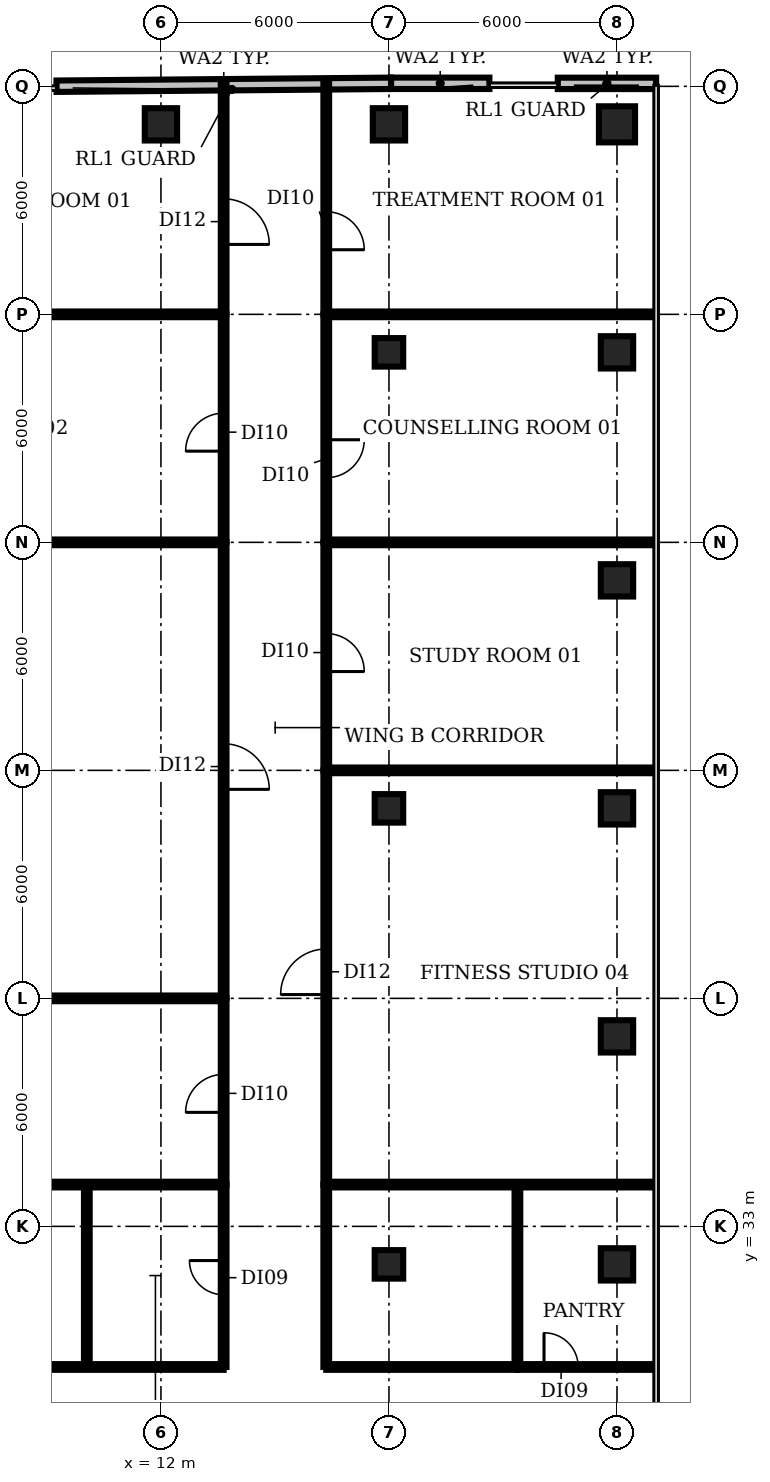
"""IFC4 building model, lengths in metres.
Left out: names, types, materials, properties, quantities, classifications, styles, units other than length and angle.
Written with IfcOpenShell. Run it as: python <this file> out.ifc"""

import sys

from ifc_helpers import new_model, si_unit, direction, frame, frame_2d, origin, origin_2d, place, context, subcontext, project, spatial, rectangle, circle, extrude, element, fill, save


model = new_model("IFC4")
c1 = context("Model", 3, precision=1e-05, world=origin(), true_north=direction((0.0, 1.0)))
c2 = subcontext(c1, "Body", "Model", "MODEL_VIEW")
j1 = project(units=[si_unit("LENGTHUNIT", "METRE"), si_unit("PLANEANGLEUNIT", "RADIAN")], contexts=[c1])
p1 = place(None, origin())
s1 = spatial("IfcSite", under=j1, at=p1, CompositionType="ELEMENT")
p2 = place(p1, origin())
s2 = spatial("IfcBuilding", under=s1, at=p2, CompositionType="ELEMENT")
p3 = place(p2, frame((0.0, 0.0, 171.8)))
s3 = spatial("IfcBuildingStorey", under=s2, at=p3, CompositionType="ELEMENT", Elevation=171.8)
p4 = place(p3, frame((12.0, 62.0, 0.0), z_axis=(0.0, 0.0, 1.0), x_axis=(1.0, 0.0, 0.0)))
e1 = element("IfcColumn", 1, at=p4, inside=s3, PredefinedType="COLUMN", context=c2, shape_type="SweptSolid", body=[
    extrude(rectangle(XDim=0.85, YDim=0.85, at=origin_2d()), origin(), (0.0, 0.0, 1.0), 3.85),
])
for number, where, z_axis, x_axis in (
    (2, (18.0, 32.0, 0.0), (0.0, 0.0, 1.0), (1.0, 0.0, 0.0)),
    (3, (18.0, 44.0, 0.0), (0.0, 0.0, 1.0), (1.0, 0.0, 0.0)),
    (4, (18.0, 56.0, 0.0), (0.0, 0.0, 1.0), (1.0, 0.0, 0.0)),
):
    element("IfcColumn", number, at=place(p3, frame(where, z_axis=z_axis, x_axis=x_axis)), inside=s3, PredefinedType="COLUMN", context=c2, shape_type="SweptSolid", body=[
        extrude(rectangle(XDim=0.75, YDim=0.75, at=origin_2d()), origin(), (0.0, 0.0, 1.0), 3.85),
    ])
for number, where, z_axis, x_axis in (
    (5, (18.0, 62.0, 0.0), (0.0, 0.0, 1.0), (1.0, 0.0, 0.0)),
    (6, (24.0, 32.0, 0.0), (0.0, 0.0, 1.0), (1.0, 0.0, 0.0)),
    (7, (24.0, 38.0, 0.0), (0.0, 0.0, 1.0), (1.0, 0.0, 0.0)),
    (8, (24.0, 44.0, 0.0), (0.0, 0.0, 1.0), (1.0, 0.0, 0.0)),
    (9, (24.0, 50.0, 0.0), (0.0, 0.0, 1.0), (1.0, 0.0, 0.0)),
    (10, (24.0, 56.0, 0.0), (0.0, 0.0, 1.0), (1.0, 0.0, 0.0)),
):
    element("IfcColumn", number, at=place(p3, frame(where, z_axis=z_axis, x_axis=x_axis)), inside=s3, PredefinedType="COLUMN", context=c2, shape_type="SweptSolid", body=[
        extrude(rectangle(XDim=0.85, YDim=0.85, at=origin_2d()), origin(), (0.0, 0.0, 1.0), 3.85),
    ])
p5 = place(p3, frame((24.0, 62.0, 0.0), z_axis=(0.0, 0.0, 1.0), x_axis=(1.0, 0.0, 0.0)))
e11 = element("IfcColumn", 11, at=p5, inside=s3, PredefinedType="COLUMN", context=c2, shape_type="SweptSolid", body=[
    extrude(circle(Radius=0.475, at=origin_2d()), origin(), (0.0, 0.0, 1.0), 3.85),
])
p6 = place(p3, frame((25.03, 63.078, 0.0), z_axis=(0.0, 0.0, 1.0), x_axis=(-1.0, 0.0, 0.0)))
e12 = element("IfcWall", 12, at=p6, inside=s3, PredefinedType="SOLIDWALL", context=c2, shape_type="SweptSolid", body=[
    extrude(rectangle(XDim=2.588, YDim=0.3, at=frame_2d((1.294, 0.0))), origin(), (0.0, 0.0, 1.0), 3.85),
])
p7 = place(p3, frame((20.642, 63.08, 0.0), z_axis=(0.0, 0.0, 1.0), x_axis=(-1.0, 0.0, 0.0)))
e13 = element("IfcWall", 13, at=p7, inside=s3, PredefinedType="SOLIDWALL", context=c2, shape_type="SweptSolid", body=[
    extrude(rectangle(XDim=2.588, YDim=0.3, at=frame_2d((1.294, 0.0))), origin(), (0.0, 0.0, 1.0), 3.85),
])
p8 = place(p3, frame((18.054, 63.08, 0.0), z_axis=(0.0, 0.0, 1.0), x_axis=(-0.999961829169, -0.00873728818, 0.0)))
e14 = element("IfcWall", 14, at=p8, inside=s3, PredefinedType="SOLIDWALL", context=c2, shape_type="SweptSolid", body=[
    extrude(rectangle(XDim=8.802, YDim=0.3, at=frame_2d((4.401, 0.0))), origin(), (0.0, 0.0, 1.0), 3.85),
])
p9 = place(p3, frame((-1.25, 57.0, 0.0), z_axis=(0.0, 0.0, 1.0), x_axis=(1.0, 0.0, 0.0)))
e15 = element("IfcWall", 15, at=p9, inside=s3, PredefinedType="PARTITIONING", context=c2, shape_type="SweptSolid", body=[
    extrude(rectangle(XDim=14.9, YDim=0.15, at=frame_2d((7.45, 0.0))), origin(), (0.0, 0.0, 1.0), 2.88),
])
p10 = place(p3, frame((-1.19, 51.0, 0.0), z_axis=(0.0, 0.0, 1.0), x_axis=(1.0, 0.0, 0.0)))
e16 = element("IfcWall", 16, at=p10, inside=s3, PredefinedType="PARTITIONING", context=c2, shape_type="SweptSolid", body=[
    extrude(rectangle(XDim=14.84, YDim=0.15, at=frame_2d((7.42, 0.0))), origin(), (0.0, 0.0, 1.0), 2.88),
])
p11 = place(p3, frame((-1.09, 39.0, 0.0), z_axis=(0.0, 0.0, 1.0), x_axis=(1.0, 0.0, 0.0)))
e17 = element("IfcWall", 17, at=p11, inside=s3, PredefinedType="PARTITIONING", context=c2, shape_type="SweptSolid", body=[
    extrude(rectangle(XDim=14.74, YDim=0.15, at=frame_2d((7.37, 0.0))), origin(), (0.0, 0.0, 1.0), 2.88),
])
p12 = place(p3, frame((-1.05, 34.1, 0.0), z_axis=(0.0, 0.0, 1.0), x_axis=(1.0, 0.0, 0.0)))
e18 = element("IfcWall", 18, at=p12, inside=s3, PredefinedType="PARTITIONING", context=c2, shape_type="SweptSolid", body=[
    extrude(rectangle(XDim=14.7, YDim=0.15, at=frame_2d((7.35, 0.0))), origin(), (0.0, 0.0, 1.0), 2.88),
])
p13 = place(p3, frame((8.8, 29.3, 0.0), z_axis=(0.0, 0.0, 1.0), x_axis=(1.0, 0.0, 0.0)))
e19 = element("IfcWall", 19, at=p13, inside=s3, PredefinedType="PARTITIONING", context=c2, shape_type="SweptSolid", body=[
    extrude(rectangle(XDim=4.85, YDim=0.15, at=frame_2d((2.425, 0.0))), origin(), (0.0, 0.0, 1.0), 2.88),
])
p14 = place(p3, frame((10.05, 29.3, 0.0), z_axis=(0.0, 0.0, 1.0), x_axis=(0.0, 1.0, 0.0)))
e20 = element("IfcWall", 20, at=p14, inside=s3, PredefinedType="PARTITIONING", context=c2, shape_type="SweptSolid", body=[
    extrude(rectangle(XDim=4.8, YDim=0.15, at=frame_2d((2.4, 0.0))), origin(), (0.0, 0.0, 1.0), 2.88),
])
p15 = place(p3, frame((13.65, 29.3, 0.0), z_axis=(0.0, 0.0, 1.0), x_axis=(0.0, 1.0, 0.0)))
e21 = element("IfcWall", 21, at=p15, inside=s3, PredefinedType="PARTITIONING", context=c2, shape_type="SweptSolid", body=[
    extrude(rectangle(XDim=4.8, YDim=0.15, at=frame_2d((2.4, 0.0))), origin(), (0.0, 0.0, 1.0), 2.88),
])
p16 = place(p15, frame((1.9, 0.0, 0.0)))
e22 = element("IfcOpeningElement", 22, at=p16, cuts=e21, PredefinedType="OPENING", context=c2, shape_type="SweptSolid", body=[
    extrude(rectangle(XDim=0.9, YDim=2.1, at=frame_2d((0.45, 1.05))), frame((0.0, 0.085, 0.0), z_axis=(0.0, -1.0, 0.0), x_axis=(1.0, 0.0, 0.0)), (0.0, 0.0, 1.0), 0.17),
])
p17 = place(p3, frame((13.65, 34.1, 0.0), z_axis=(0.0, 0.0, 1.0), x_axis=(0.0, 1.0, 0.0)))
e23 = element("IfcWall", 23, at=p17, inside=s3, PredefinedType="PARTITIONING", context=c2, shape_type="SweptSolid", body=[
    extrude(rectangle(XDim=4.9, YDim=0.15, at=frame_2d((2.45, 0.0))), origin(), (0.0, 0.0, 1.0), 2.88),
])
p18 = place(p17, frame((1.9, 0.0, 0.0)))
e24 = element("IfcOpeningElement", 24, at=p18, cuts=e23, PredefinedType="OPENING", context=c2, shape_type="SweptSolid", body=[
    extrude(rectangle(XDim=1.0, YDim=2.1, at=frame_2d((0.5, 1.05))), frame((0.0, 0.085, 0.0), z_axis=(0.0, -1.0, 0.0), x_axis=(1.0, 0.0, 0.0)), (0.0, 0.0, 1.0), 0.17),
])
p19 = place(p3, frame((13.65, 51.0, 0.0), z_axis=(0.0, 0.0, 1.0), x_axis=(0.0, -1.0, 0.0)))
e25 = element("IfcWall", 25, at=p19, inside=s3, PredefinedType="PARTITIONING", context=c2, shape_type="SweptSolid", body=[
    extrude(rectangle(XDim=12.0, YDim=0.15, at=frame_2d((6.0, 0.0))), origin(), (0.0, 0.0, 1.0), 2.88),
])
p20 = place(p19, frame((5.3, 0.0, 0.0)))
e26 = element("IfcOpeningElement", 26, at=p20, cuts=e25, PredefinedType="OPENING", context=c2, shape_type="SweptSolid", body=[
    extrude(rectangle(XDim=1.2, YDim=2.1, at=frame_2d((0.6, 1.05))), frame((0.0, 0.085, 0.0), z_axis=(0.0, -1.0, 0.0), x_axis=(1.0, 0.0, 0.0)), (0.0, 0.0, 1.0), 0.17),
])
p21 = place(p3, frame((13.65, 51.0, 0.0), z_axis=(0.0, 0.0, 1.0), x_axis=(0.0, 1.0, 0.0)))
e27 = element("IfcWall", 27, at=p21, inside=s3, PredefinedType="PARTITIONING", context=c2, shape_type="SweptSolid", body=[
    extrude(rectangle(XDim=6.0, YDim=0.15, at=frame_2d((3.0, 0.0))), origin(), (0.0, 0.0, 1.0), 2.88),
])
p22 = place(p21, frame((2.4, 0.0, 0.0)))
e28 = element("IfcOpeningElement", 28, at=p22, cuts=e27, PredefinedType="OPENING", context=c2, shape_type="SweptSolid", body=[
    extrude(rectangle(XDim=1.0, YDim=2.1, at=frame_2d((0.5, 1.05))), frame((0.0, 0.085, 0.0), z_axis=(0.0, -1.0, 0.0), x_axis=(1.0, 0.0, 0.0)), (0.0, 0.0, 1.0), 0.17),
])
p23 = place(p3, frame((13.65, 63.052, 0.0), z_axis=(0.0, 0.0, 1.0), x_axis=(0.0, -1.0, 0.0)))
e29 = element("IfcWall", 29, at=p23, inside=s3, PredefinedType="PARTITIONING", context=c2, shape_type="SweptSolid", body=[
    extrude(rectangle(XDim=6.052, YDim=0.15, at=frame_2d((3.026, 0.0))), origin(), (0.0, 0.0, 1.0), 2.88),
])
p24 = place(p23, frame((3.012, 0.0, 0.0)))
e30 = element("IfcOpeningElement", 30, at=p24, cuts=e29, PredefinedType="OPENING", context=c2, shape_type="SweptSolid", body=[
    extrude(rectangle(XDim=1.2, YDim=2.1, at=frame_2d((0.6, 1.05))), frame((0.0, 0.085, 0.0), z_axis=(0.0, -1.0, 0.0), x_axis=(1.0, 0.0, 0.0)), (0.0, 0.0, 1.0), 0.17),
])
p25 = place(p3, frame((16.35, 29.3, 0.0), z_axis=(0.0, 0.0, 1.0), x_axis=(0.0, 1.0, 0.0)))
e31 = element("IfcWall", 31, at=p25, inside=s3, PredefinedType="PARTITIONING", context=c2, shape_type="SweptSolid", body=[
    extrude(rectangle(XDim=4.8, YDim=0.15, at=frame_2d((2.4, 0.0))), origin(), (0.0, 0.0, 1.0), 2.88),
])
p26 = place(p3, frame((16.35, 29.3, 0.0), z_axis=(0.0, 0.0, 1.0), x_axis=(1.0, 0.0, 0.0)))
e32 = element("IfcWall", 32, at=p26, inside=s3, PredefinedType="PARTITIONING", context=c2, shape_type="SweptSolid", body=[
    extrude(rectangle(XDim=5.03, YDim=0.15, at=frame_2d((2.515, 0.0))), origin(), (0.0, 0.0, 1.0), 2.88),
])
p27 = place(p3, frame((16.35, 34.1, 0.0), z_axis=(0.0, 0.0, 1.0), x_axis=(0.0, 1.0, 0.0)))
e33 = element("IfcWall", 33, at=p27, inside=s3, PredefinedType="PARTITIONING", context=c2, shape_type="SweptSolid", body=[
    extrude(rectangle(XDim=10.9, YDim=0.15, at=frame_2d((5.45, 0.0))), origin(), (0.0, 0.0, 1.0), 2.88),
])
p28 = place(p27, frame((5.0, 0.0, 0.0)))
e34 = element("IfcOpeningElement", 34, at=p28, cuts=e33, PredefinedType="OPENING", context=c2, shape_type="SweptSolid", body=[
    extrude(rectangle(XDim=1.2, YDim=2.1, at=frame_2d((0.6, 1.05))), frame((0.0, 0.085, 0.0), z_axis=(0.0, -1.0, 0.0), x_axis=(1.0, 0.0, 0.0)), (0.0, 0.0, 1.0), 0.17),
])
for number, where, z_axis, x_axis in (
    (35, (16.35, 34.1, 0.0), (0.0, 0.0, 1.0), (1.0, 0.0, 0.0)),
    (36, (16.35, 45.0, 0.0), (0.0, 0.0, 1.0), (1.0, 0.0, 0.0)),
):
    element("IfcWall", number, at=place(p3, frame(where, z_axis=z_axis, x_axis=x_axis)), inside=s3, PredefinedType="PARTITIONING", context=c2, shape_type="SweptSolid", body=[
        extrude(rectangle(XDim=8.63, YDim=0.15, at=frame_2d((4.315, 0.0))), origin(), (0.0, 0.0, 1.0), 2.88),
    ])
p29 = place(p3, frame((16.35, 51.0, 0.0), z_axis=(0.0, 0.0, 1.0), x_axis=(0.0, -1.0, 0.0)))
e37 = element("IfcWall", 37, at=p29, inside=s3, PredefinedType="PARTITIONING", context=c2, shape_type="SweptSolid", body=[
    extrude(rectangle(XDim=6.0, YDim=0.15, at=frame_2d((3.0, 0.0))), origin(), (0.0, 0.0, 1.0), 2.88),
])
p30 = place(p29, frame((2.4, 0.0, 0.0)))
e38 = element("IfcOpeningElement", 38, at=p30, cuts=e37, PredefinedType="OPENING", context=c2, shape_type="SweptSolid", body=[
    extrude(rectangle(XDim=1.0, YDim=2.1, at=frame_2d((0.5, 1.05))), frame((0.0, 0.085, 0.0), z_axis=(0.0, -1.0, 0.0), x_axis=(1.0, 0.0, 0.0)), (0.0, 0.0, 1.0), 0.17),
])
p31 = place(p3, frame((16.35, 51.0, 0.0), z_axis=(0.0, 0.0, 1.0), x_axis=(1.0, 0.0, 0.0)))
e39 = element("IfcWall", 39, at=p31, inside=s3, PredefinedType="PARTITIONING", context=c2, shape_type="SweptSolid", body=[
    extrude(rectangle(XDim=8.63, YDim=0.15, at=frame_2d((4.315, 0.0))), origin(), (0.0, 0.0, 1.0), 2.88),
])
p32 = place(p3, frame((16.35, 57.0, 0.0), z_axis=(0.0, 0.0, 1.0), x_axis=(0.0, -1.0, 0.0)))
e40 = element("IfcWall", 40, at=p32, inside=s3, PredefinedType="PARTITIONING", context=c2, shape_type="SweptSolid", body=[
    extrude(rectangle(XDim=6.0, YDim=0.15, at=frame_2d((3.0, 0.0))), origin(), (0.0, 0.0, 1.0), 2.88),
])
p33 = place(p32, frame((3.3, 0.0, 0.0)))
e41 = element("IfcOpeningElement", 41, at=p33, cuts=e40, PredefinedType="OPENING", context=c2, shape_type="SweptSolid", body=[
    extrude(rectangle(XDim=1.0, YDim=2.1, at=frame_2d((0.5, 1.05))), frame((0.0, 0.085, 0.0), z_axis=(0.0, -1.0, 0.0), x_axis=(1.0, 0.0, 0.0)), (0.0, 0.0, 1.0), 0.17),
])
p34 = place(p3, frame((16.35, 57.0, 0.0), z_axis=(0.0, 0.0, 1.0), x_axis=(1.0, 0.0, 0.0)))
e42 = element("IfcWall", 42, at=p34, inside=s3, PredefinedType="PARTITIONING", context=c2, shape_type="SweptSolid", body=[
    extrude(rectangle(XDim=8.615, YDim=0.15, at=frame_2d((4.308, 0.0))), origin(), (0.0, 0.0, 1.0), 2.88),
])
p35 = place(p3, frame((16.35, 63.075, 0.0), z_axis=(0.0, 0.0, 1.0), x_axis=(0.0, -1.0, 0.0)))
e43 = element("IfcWall", 43, at=p35, inside=s3, PredefinedType="PARTITIONING", context=c2, shape_type="SweptSolid", body=[
    extrude(rectangle(XDim=6.075, YDim=0.15, at=frame_2d((3.038, 0.0))), origin(), (0.0, 0.0, 1.0), 2.88),
])
p36 = place(p35, frame((3.375, 0.0, 0.0)))
e44 = element("IfcOpeningElement", 44, at=p36, cuts=e43, PredefinedType="OPENING", context=c2, shape_type="SweptSolid", body=[
    extrude(rectangle(XDim=1.0, YDim=2.1, at=frame_2d((0.5, 1.05))), frame((0.0, 0.085, 0.0), z_axis=(0.0, -1.0, 0.0), x_axis=(1.0, 0.0, 0.0)), (0.0, 0.0, 1.0), 0.17),
])
p37 = place(p3, frame((21.38, 29.3, 0.0), z_axis=(0.0, 0.0, 1.0), x_axis=(0.0, 1.0, 0.0)))
e45 = element("IfcWall", 45, at=p37, inside=s3, PredefinedType="PARTITIONING", context=c2, shape_type="SweptSolid", body=[
    extrude(rectangle(XDim=4.8, YDim=0.15, at=frame_2d((2.4, 0.0))), origin(), (0.0, 0.0, 1.0), 2.88),
])
p38 = place(p3, frame((21.38, 29.3, 0.0), z_axis=(0.0, 0.0, 1.0), x_axis=(1.0, 0.0, 0.0)))
e46 = element("IfcWall", 46, at=p38, inside=s3, PredefinedType="PARTITIONING", context=c2, shape_type="SweptSolid", body=[
    extrude(rectangle(XDim=3.6, YDim=0.15, at=frame_2d((1.8, 0.0))), origin(), (0.0, 0.0, 1.0), 2.88),
])
p39 = place(p38, frame((0.7, 0.0, 0.0)))
e47 = element("IfcOpeningElement", 47, at=p39, cuts=e46, PredefinedType="OPENING", context=c2, shape_type="SweptSolid", body=[
    extrude(rectangle(XDim=0.9, YDim=2.1, at=frame_2d((0.45, 1.05))), frame((0.0, 0.085, 0.0), z_axis=(0.0, -1.0, 0.0), x_axis=(1.0, 0.0, 0.0)), (0.0, 0.0, 1.0), 0.17),
])
p40 = place(p16, origin())
e48 = element("IfcDoor", 48, at=p40, inside=s3, OperationType="SINGLE_SWING_RIGHT", PredefinedType="DOOR", context=c2, shape_type="SweptSolid", body=[
    extrude(rectangle(XDim=0.9, YDim=2.1, at=frame_2d((0.45, 1.05))), frame((0.0, 0.025, 0.0), z_axis=(0.0, -1.0, 0.0), x_axis=(1.0, 0.0, 0.0)), (0.0, 0.0, 1.0), 0.05),
])
fill(e22, e48)
p41 = place(p18, origin())
e49 = element("IfcDoor", 49, at=p41, inside=s3, OperationType="SINGLE_SWING_LEFT", PredefinedType="DOOR", context=c2, shape_type="SweptSolid", body=[
    extrude(rectangle(XDim=1.0, YDim=2.1, at=frame_2d((0.5, 1.05))), frame((0.0, 0.025, 0.0), z_axis=(0.0, -1.0, 0.0), x_axis=(1.0, 0.0, 0.0)), (0.0, 0.0, 1.0), 0.05),
])
fill(e24, e49)
p42 = place(p20, origin())
e50 = element("IfcDoor", 50, at=p42, inside=s3, OperationType="SINGLE_SWING_RIGHT", PredefinedType="DOOR", context=c2, shape_type="SweptSolid", body=[
    extrude(rectangle(XDim=1.2, YDim=2.1, at=frame_2d((0.6, 1.05))), frame((0.0, 0.025, 0.0), z_axis=(0.0, -1.0, 0.0), x_axis=(1.0, 0.0, 0.0)), (0.0, 0.0, 1.0), 0.05),
])
fill(e26, e50)
p43 = place(p22, origin())
e51 = element("IfcDoor", 51, at=p43, inside=s3, OperationType="SINGLE_SWING_LEFT", PredefinedType="DOOR", context=c2, shape_type="SweptSolid", body=[
    extrude(rectangle(XDim=1.0, YDim=2.1, at=frame_2d((0.5, 1.05))), frame((0.0, 0.025, 0.0), z_axis=(0.0, -1.0, 0.0), x_axis=(1.0, 0.0, 0.0)), (0.0, 0.0, 1.0), 0.05),
])
fill(e28, e51)
p44 = place(p24, origin())
e52 = element("IfcDoor", 52, at=p44, inside=s3, OperationType="SINGLE_SWING_RIGHT", PredefinedType="DOOR", context=c2, shape_type="SweptSolid", body=[
    extrude(rectangle(XDim=1.2, YDim=2.1, at=frame_2d((0.6, 1.05))), frame((0.0, 0.025, 0.0), z_axis=(0.0, -1.0, 0.0), x_axis=(1.0, 0.0, 0.0)), (0.0, 0.0, 1.0), 0.05),
])
fill(e30, e52)
p45 = place(p28, origin())
e53 = element("IfcDoor", 53, at=p45, inside=s3, OperationType="SINGLE_SWING_LEFT", PredefinedType="DOOR", context=c2, shape_type="SweptSolid", body=[
    extrude(rectangle(XDim=1.2, YDim=2.1, at=frame_2d((0.6, 1.05))), frame((0.0, 0.025, 0.0), z_axis=(0.0, -1.0, 0.0), x_axis=(1.0, 0.0, 0.0)), (0.0, 0.0, 1.0), 0.05),
])
fill(e34, e53)
p46 = place(p30, origin())
e54 = element("IfcDoor", 54, at=p46, inside=s3, OperationType="SINGLE_SWING_RIGHT", PredefinedType="DOOR", context=c2, shape_type="SweptSolid", body=[
    extrude(rectangle(XDim=1.0, YDim=2.1, at=frame_2d((0.5, 1.05))), frame((0.0, 0.025, 0.0), z_axis=(0.0, -1.0, 0.0), x_axis=(1.0, 0.0, 0.0)), (0.0, 0.0, 1.0), 0.05),
])
fill(e38, e54)
p47 = place(p33, origin())
e55 = element("IfcDoor", 55, at=p47, inside=s3, OperationType="SINGLE_SWING_LEFT", PredefinedType="DOOR", context=c2, shape_type="SweptSolid", body=[
    extrude(rectangle(XDim=1.0, YDim=2.1, at=frame_2d((0.5, 1.05))), frame((0.0, 0.025, 0.0), z_axis=(0.0, -1.0, 0.0), x_axis=(1.0, 0.0, 0.0)), (0.0, 0.0, 1.0), 0.05),
])
fill(e41, e55)
p48 = place(p36, origin())
e56 = element("IfcDoor", 56, at=p48, inside=s3, OperationType="SINGLE_SWING_RIGHT", PredefinedType="DOOR", context=c2, shape_type="SweptSolid", body=[
    extrude(rectangle(XDim=1.0, YDim=2.1, at=frame_2d((0.5, 1.05))), frame((0.0, 0.025, 0.0), z_axis=(0.0, -1.0, 0.0), x_axis=(1.0, 0.0, 0.0)), (0.0, 0.0, 1.0), 0.05),
])
fill(e44, e56)
p49 = place(p39, origin())
e57 = element("IfcDoor", 57, at=p49, inside=s3, OperationType="SINGLE_SWING_LEFT", PredefinedType="DOOR", context=c2, shape_type="SweptSolid", body=[
    extrude(rectangle(XDim=0.9, YDim=2.1, at=frame_2d((0.45, 1.05))), frame((0.0, 0.025, 0.0), z_axis=(0.0, -1.0, 0.0), x_axis=(1.0, 0.0, 0.0)), (0.0, 0.0, 1.0), 0.05),
])
fill(e47, e57)
save(model, sys.argv[1])
